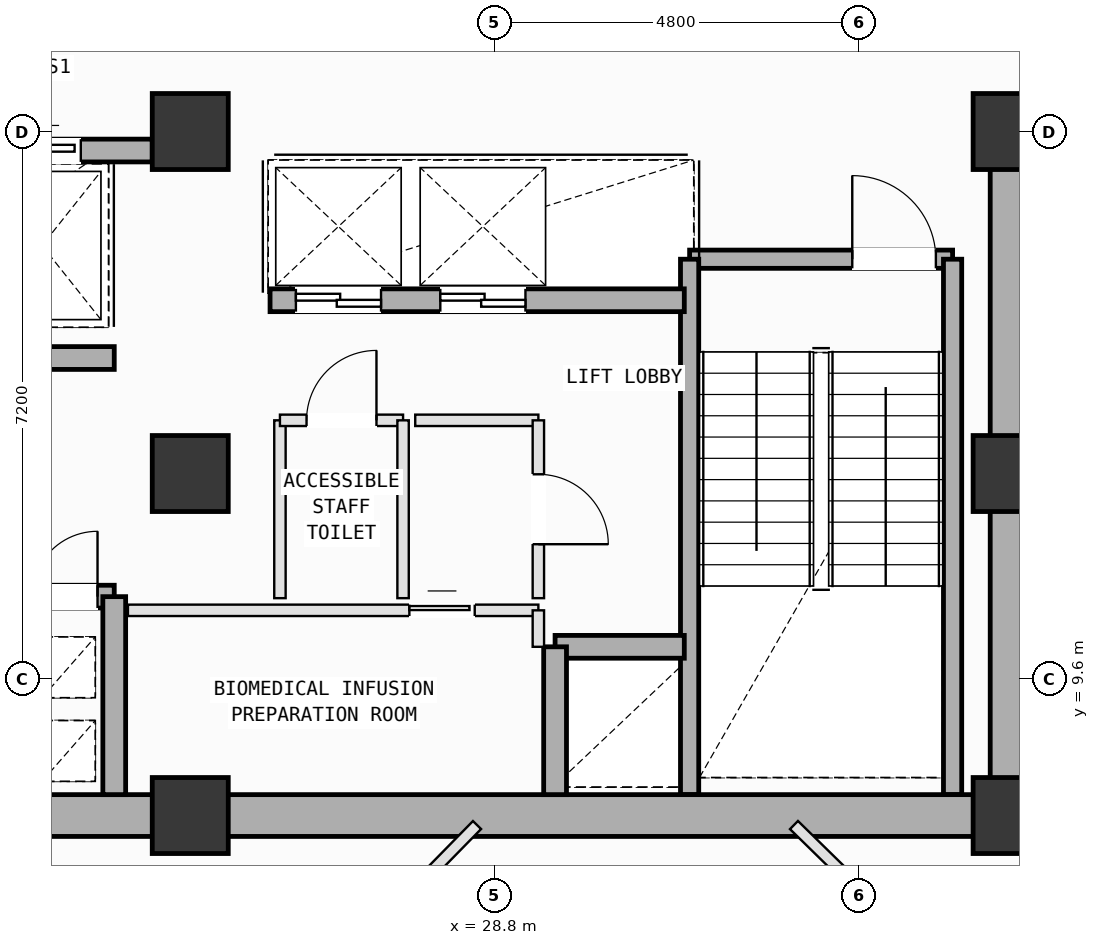
"""IFC4 building model, lengths in metres.
Left out: names, types, materials, properties, quantities, classifications, styles, units other than length and angle.
Written with IfcOpenShell. Run it as: python <this file> out.ifc"""

import sys

from ifc_helpers import new_model, si_unit, direction, frame, frame_2d, origin, origin_2d, place, context, subcontext, project, spatial, rectangle, extrude, element, fill, save


model = new_model("IFC4")
c1 = context("Model", 3, precision=1e-05, world=origin(), true_north=direction((0.0, 1.0)))
c2 = subcontext(c1, "Body", "Model", "MODEL_VIEW")
j1 = project(units=[si_unit("LENGTHUNIT", "METRE"), si_unit("PLANEANGLEUNIT", "RADIAN")], contexts=[c1])
p1 = place(None, origin())
s1 = spatial("IfcSite", under=j1, at=p1, CompositionType="ELEMENT")
p2 = place(p1, origin())
s2 = spatial("IfcBuilding", under=s1, at=p2, CompositionType="ELEMENT")
p3 = place(p2, frame((0.0, 0.0, 219.2)))
s3 = spatial("IfcBuildingStorey", under=s2, at=p3, CompositionType="ELEMENT", Elevation=219.2)
for number, where, z_axis, x_axis in (
    (1, (24.8, 7.8, 0.0), (0.0, 0.0, 1.0), (1.0, 0.0, 0.0)),
    (2, (24.8, 12.3, 0.0), (0.0, 0.0, 1.0), (1.0, 0.0, 0.0)),
    (3, (24.8, 16.8, 0.0), (0.0, 0.0, 1.0), (1.0, 0.0, 0.0)),
    (4, (35.6, 7.8, 0.0), (0.0, 0.0, 1.0), (1.0, 0.0, 0.0)),
    (5, (35.6, 12.3, 0.0), (0.0, 0.0, 1.0), (1.0, 0.0, 0.0)),
    (6, (35.6, 16.8, 0.0), (0.0, 0.0, 1.0), (1.0, 0.0, 0.0)),
):
    element("IfcColumn", number, at=place(p3, frame(where, z_axis=z_axis, x_axis=x_axis)), inside=s3, PredefinedType="COLUMN", context=c2, shape_type="SweptSolid", body=[
        extrude(rectangle(XDim=1.0, YDim=1.0, at=origin_2d()), origin(), (0.0, 0.0, 1.0), 4.0),
    ])
p4 = place(p3, frame((31.37, 15.12, 0.0), z_axis=(0.0, 0.0, 1.0), x_axis=(1.0, 0.0, 0.0)))
e7 = element("IfcWall", 7, at=p4, inside=s3, PredefinedType="SOLIDWALL", context=c2, shape_type="SweptSolid", body=[
    extrude(rectangle(XDim=3.46, YDim=0.24, at=frame_2d((1.73, 0.0))), origin(), (0.0, 0.0, 1.0), 3.78),
])
p5 = place(p4, frame((2.14, 0.0, 0.0)))
e8 = element("IfcOpeningElement", 8, at=p5, cuts=e7, PredefinedType="OPENING", context=c2, shape_type="SweptSolid", body=[
    extrude(rectangle(XDim=1.1, YDim=2.15, at=frame_2d((0.55, 1.075))), frame((0.0, 0.13, 0.0), z_axis=(0.0, -1.0, 0.0), x_axis=(1.0, 0.0, 0.0)), (0.0, 0.0, 1.0), 0.26),
])
for number, where, z_axis, x_axis in (
    (9, (34.83, 15.12, 0.0), (0.0, 0.0, 1.0), (0.0, -1.0, 0.0)),
    (10, (31.37, 8.075, 0.0), (0.0, 0.0, 1.0), (0.0, 1.0, 0.0)),
):
    element("IfcWall", number, at=place(p3, frame(where, z_axis=z_axis, x_axis=x_axis)), inside=s3, PredefinedType="SOLIDWALL", context=c2, shape_type="SweptSolid", body=[
        extrude(rectangle(XDim=7.045, YDim=0.24, at=frame_2d((3.522, 0.0))), origin(), (0.0, 0.0, 1.0), 3.78),
    ])
for number, where, z_axis, x_axis in (
    (11, (14.0, 7.8, 0.0), (0.0, 0.0, 1.0), (1.0, 0.0, 0.0)),
    (12, (24.8, 7.8, 0.0), (0.0, 0.0, 1.0), (1.0, 0.0, 0.0)),
):
    element("IfcWall", number, at=place(p3, frame(where, z_axis=z_axis, x_axis=x_axis)), inside=s3, PredefinedType="SHEAR", context=c2, shape_type="SweptSolid", body=[
        extrude(rectangle(XDim=10.8, YDim=0.55, at=frame_2d((5.4, 0.0))), origin(), (0.0, 0.0, 1.0), 3.78),
    ])
p6 = place(p3, frame((35.6, 7.8, 0.0), z_axis=(0.0, 0.0, 1.0), x_axis=(0.0, 1.0, 0.0)))
e13 = element("IfcWall", 13, at=p6, inside=s3, PredefinedType="SHEAR", context=c2, shape_type="SweptSolid", body=[
    extrude(rectangle(XDim=9.0, YDim=0.55, at=frame_2d((4.5, 0.0))), origin(), (0.0, 0.0, 1.0), 3.78),
])
p7 = place(p3, frame((19.85, 16.55, 0.0), z_axis=(0.0, 0.0, 1.0), x_axis=(1.0, 0.0, 0.0)))
e14 = element("IfcWall", 14, at=p7, inside=s3, PredefinedType="SOLIDWALL", context=c2, shape_type="SweptSolid", body=[
    extrude(rectangle(XDim=4.45, YDim=0.3, at=frame_2d((2.225, 0.0))), origin(), (0.0, 0.0, 1.0), 3.78),
])
p8 = place(p7, frame((0.475, 0.0, 0.0)))
e15 = element("IfcOpeningElement", 15, at=p8, cuts=e14, PredefinedType="OPENING", context=c2, shape_type="SweptSolid", body=[
    extrude(rectangle(XDim=1.25, YDim=2.18, at=frame_2d((0.625, 1.09))), frame((0.0, 0.16, 0.0), z_axis=(0.0, -1.0, 0.0), x_axis=(1.0, 0.0, 0.0)), (0.0, 0.0, 1.0), 0.32),
])
p9 = place(p7, frame((2.49, 0.0, 0.0)))
e16 = element("IfcOpeningElement", 16, at=p9, cuts=e14, PredefinedType="OPENING", context=c2, shape_type="SweptSolid", body=[
    extrude(rectangle(XDim=1.02, YDim=2.12, at=frame_2d((0.51, 1.06))), frame((0.0, 0.16, 0.0), z_axis=(0.0, -1.0, 0.0), x_axis=(1.0, 0.0, 0.0)), (0.0, 0.0, 1.0), 0.32),
])
p10 = place(p3, frame((18.5, 10.68, 0.0), z_axis=(0.0, 0.0, 1.0), x_axis=(1.0, 0.0, 0.0)))
e17 = element("IfcWall", 17, at=p10, inside=s3, PredefinedType="SOLIDWALL", context=c2, shape_type="SweptSolid", body=[
    extrude(rectangle(XDim=5.3, YDim=0.3, at=frame_2d((2.65, 0.0))), origin(), (0.0, 0.0, 1.0), 3.78),
])
p11 = place(p10, frame((4.22, 0.0, 0.0)))
e18 = element("IfcOpeningElement", 18, at=p11, cuts=e17, PredefinedType="OPENING", context=c2, shape_type="SweptSolid", body=[
    extrude(rectangle(XDim=0.86, YDim=2.06, at=frame_2d((0.43, 1.03))), frame((0.0, 0.16, 0.0), z_axis=(0.0, -1.0, 0.0), x_axis=(1.0, 0.0, 0.0)), (0.0, 0.0, 1.0), 0.32),
])
p12 = place(p10, frame((0.425, 0.0, 0.0)))
e19 = element("IfcOpeningElement", 19, at=p12, cuts=e17, PredefinedType="OPENING", context=c2, shape_type="SweptSolid", body=[
    extrude(rectangle(XDim=1.25, YDim=2.18, at=frame_2d((0.625, 1.09))), frame((0.0, 0.16, 0.0), z_axis=(0.0, -1.0, 0.0), x_axis=(1.0, 0.0, 0.0)), (0.0, 0.0, 1.0), 0.32),
])
p13 = place(p10, frame((2.525, 0.0, 0.0)))
e20 = element("IfcOpeningElement", 20, at=p13, cuts=e17, PredefinedType="OPENING", context=c2, shape_type="SweptSolid", body=[
    extrude(rectangle(XDim=1.25, YDim=2.18, at=frame_2d((0.625, 1.09))), frame((0.0, 0.16, 0.0), z_axis=(0.0, -1.0, 0.0), x_axis=(1.0, 0.0, 0.0)), (0.0, 0.0, 1.0), 0.32),
])
p14 = place(p3, frame((18.5, 13.82, 0.0), z_axis=(0.0, 0.0, 1.0), x_axis=(1.0, 0.0, 0.0)))
e21 = element("IfcWall", 21, at=p14, inside=s3, PredefinedType="SOLIDWALL", context=c2, shape_type="SweptSolid", body=[
    extrude(rectangle(XDim=5.3, YDim=0.3, at=frame_2d((2.65, 0.0))), origin(), (0.0, 0.0, 1.0), 3.78),
])
p15 = place(p14, frame((0.18, 0.0, 0.0)))
e22 = element("IfcOpeningElement", 22, at=p15, cuts=e21, PredefinedType="OPENING", context=c2, shape_type="SweptSolid", body=[
    extrude(rectangle(XDim=1.1, YDim=2.15, at=frame_2d((0.55, 1.075))), frame((0.0, 0.16, 0.0), z_axis=(0.0, -1.0, 0.0), x_axis=(1.0, 0.0, 0.0)), (0.0, 0.0, 1.0), 0.32),
])
p16 = place(p3, frame((23.8, 8.075, 0.0), z_axis=(0.0, 0.0, 1.0), x_axis=(0.0, 1.0, 0.0)))
e23 = element("IfcWall", 23, at=p16, inside=s3, PredefinedType="SOLIDWALL", context=c2, shape_type="SweptSolid", body=[
    extrude(rectangle(XDim=2.605, YDim=0.3, at=frame_2d((1.302, 0.0))), origin(), (0.0, 0.0, 1.0), 3.78),
])
p17 = place(p3, frame((29.6, 10.02, 0.0), z_axis=(0.0, 0.0, 1.0), x_axis=(1.0, 0.0, 0.0)))
e24 = element("IfcWall", 24, at=p17, inside=s3, PredefinedType="SOLIDWALL", context=c2, shape_type="SweptSolid", body=[
    extrude(rectangle(XDim=1.7, YDim=0.3, at=frame_2d((0.85, 0.0))), origin(), (0.0, 0.0, 1.0), 3.78),
])
p18 = place(p3, frame((29.6, 8.075, 0.0), z_axis=(0.0, 0.0, 1.0), x_axis=(0.0, 1.0, 0.0)))
e25 = element("IfcWall", 25, at=p18, inside=s3, PredefinedType="SOLIDWALL", context=c2, shape_type="SweptSolid", body=[
    extrude(rectangle(XDim=1.945, YDim=0.3, at=frame_2d((0.973, 0.0))), origin(), (0.0, 0.0, 1.0), 3.78),
])
p19 = place(p3, frame((25.85, 14.58, 0.0), z_axis=(0.0, 0.0, 1.0), x_axis=(1.0, 0.0, 0.0)))
e26 = element("IfcWall", 26, at=p19, inside=s3, PredefinedType="SOLIDWALL", context=c2, shape_type="SweptSolid", body=[
    extrude(rectangle(XDim=5.45, YDim=0.3, at=frame_2d((2.725, 0.0))), origin(), (0.0, 0.0, 1.0), 3.78),
])
p20 = place(p19, frame((0.34, 0.0, 0.0)))
e27 = element("IfcOpeningElement", 27, at=p20, cuts=e26, PredefinedType="OPENING", context=c2, shape_type="SweptSolid", body=[
    extrude(rectangle(XDim=1.12, YDim=2.15, at=frame_2d((0.56, 1.075))), frame((0.0, 0.16, 0.0), z_axis=(0.0, -1.0, 0.0), x_axis=(1.0, 0.0, 0.0)), (0.0, 0.0, 1.0), 0.32),
])
p21 = place(p19, frame((2.24, 0.0, 0.0)))
e28 = element("IfcOpeningElement", 28, at=p21, cuts=e26, PredefinedType="OPENING", context=c2, shape_type="SweptSolid", body=[
    extrude(rectangle(XDim=1.12, YDim=2.15, at=frame_2d((0.56, 1.075))), frame((0.0, 0.16, 0.0), z_axis=(0.0, -1.0, 0.0), x_axis=(1.0, 0.0, 0.0)), (0.0, 0.0, 1.0), 0.32),
])
p22 = place(p3, frame((23.98, 10.5, 0.0), z_axis=(0.0, 0.0, 1.0), x_axis=(1.0, 0.0, 0.0)))
e29 = element("IfcWall", 29, at=p22, inside=s3, PredefinedType="PARTITIONING", context=c2, shape_type="SweptSolid", body=[
    extrude(rectangle(XDim=5.4, YDim=0.15, at=frame_2d((2.7, 0.0))), origin(), (0.0, 0.0, 1.0), 3.78),
])
p23 = place(p22, frame((3.703, 0.0, 0.0)))
e30 = element("IfcOpeningElement", 30, at=p23, cuts=e29, PredefinedType="OPENING", context=c2, shape_type="SweptSolid", body=[
    extrude(rectangle(XDim=0.86, YDim=2.06, at=frame_2d((0.43, 1.03))), frame((0.0, 0.085, 0.0), z_axis=(0.0, -1.0, 0.0), x_axis=(1.0, 0.0, 0.0)), (0.0, 0.0, 1.0), 0.17),
])
p24 = place(p3, frame((29.38, 10.5, 0.0), z_axis=(0.0, 0.0, 1.0), x_axis=(0.0, -1.0, 0.0)))
e31 = element("IfcWall", 31, at=p24, inside=s3, PredefinedType="PARTITIONING", context=c2, shape_type="SweptSolid", body=[
    extrude(rectangle(XDim=0.48, YDim=0.15, at=frame_2d((0.24, 0.0))), origin(), (0.0, 0.0, 1.0), 3.78),
])
p25 = place(p3, frame((25.98, 10.66, 0.0), z_axis=(0.0, 0.0, 1.0), x_axis=(0.0, 1.0, 0.0)))
e32 = element("IfcWall", 32, at=p25, inside=s3, PredefinedType="PARTITIONING", context=c2, shape_type="SweptSolid", body=[
    extrude(rectangle(XDim=2.34, YDim=0.15, at=frame_2d((1.17, 0.0))), origin(), (0.0, 0.0, 1.0), 3.78),
])
p26 = place(p3, frame((25.98, 13.0, 0.0), z_axis=(0.0, 0.0, 1.0), x_axis=(1.0, 0.0, 0.0)))
e33 = element("IfcWall", 33, at=p26, inside=s3, PredefinedType="PARTITIONING", context=c2, shape_type="SweptSolid", body=[
    extrude(rectangle(XDim=1.62, YDim=0.15, at=frame_2d((0.81, 0.0))), origin(), (0.0, 0.0, 1.0), 3.78),
])
p27 = place(p26, frame((0.35, 0.0, 0.0)))
e34 = element("IfcOpeningElement", 34, at=p27, cuts=e33, PredefinedType="OPENING", context=c2, shape_type="SweptSolid", body=[
    extrude(rectangle(XDim=0.92, YDim=2.1, at=frame_2d((0.46, 1.05))), frame((0.0, 0.085, 0.0), z_axis=(0.0, -1.0, 0.0), x_axis=(1.0, 0.0, 0.0)), (0.0, 0.0, 1.0), 0.17),
])
p28 = place(p3, frame((27.6, 13.0, 0.0), z_axis=(0.0, 0.0, 1.0), x_axis=(0.0, -1.0, 0.0)))
e35 = element("IfcWall", 35, at=p28, inside=s3, PredefinedType="PARTITIONING", context=c2, shape_type="SweptSolid", body=[
    extrude(rectangle(XDim=2.34, YDim=0.15, at=frame_2d((1.17, 0.0))), origin(), (0.0, 0.0, 1.0), 3.78),
])
p29 = place(p3, frame((27.76, 13.0, 0.0), z_axis=(0.0, 0.0, 1.0), x_axis=(1.0, 0.0, 0.0)))
e36 = element("IfcWall", 36, at=p29, inside=s3, PredefinedType="PARTITIONING", context=c2, shape_type="SweptSolid", body=[
    extrude(rectangle(XDim=1.62, YDim=0.15, at=frame_2d((0.81, 0.0))), origin(), (0.0, 0.0, 1.0), 3.78),
])
p30 = place(p3, frame((29.38, 13.0, 0.0), z_axis=(0.0, 0.0, 1.0), x_axis=(0.0, -1.0, 0.0)))
e37 = element("IfcWall", 37, at=p30, inside=s3, PredefinedType="PARTITIONING", context=c2, shape_type="SweptSolid", body=[
    extrude(rectangle(XDim=2.34, YDim=0.15, at=frame_2d((1.17, 0.0))), origin(), (0.0, 0.0, 1.0), 3.78),
])
p31 = place(p30, frame((0.71, 0.0, 0.0)))
e38 = element("IfcOpeningElement", 38, at=p31, cuts=e37, PredefinedType="OPENING", context=c2, shape_type="SweptSolid", body=[
    extrude(rectangle(XDim=0.92, YDim=2.1, at=frame_2d((0.46, 1.05))), frame((0.0, 0.085, 0.0), z_axis=(0.0, -1.0, 0.0), x_axis=(1.0, 0.0, 0.0)), (0.0, 0.0, 1.0), 0.17),
])
p32 = place(p3, frame((32.743, 7.675, 0.0), z_axis=(0.0, 0.0, 1.0), x_axis=(0.714416186627, -0.699721024613, 0.0)))
e39 = element("IfcWall", 39, at=p32, inside=s3, PredefinedType="PARTITIONING", context=c2, shape_type="SweptSolid", body=[
    extrude(rectangle(XDim=10.766, YDim=0.15, at=frame_2d((5.383, 0.0))), origin(), (0.0, 0.0, 1.0), 3.78),
])
p33 = place(p32, frame((5.176, 0.0, 0.0)))
e40 = element("IfcOpeningElement", 40, at=p33, cuts=e39, PredefinedType="OPENING", context=c2, shape_type="SweptSolid", body=[
    extrude(rectangle(XDim=0.86, YDim=2.06, at=frame_2d((0.43, 1.03))), frame((0.0, 0.085, 0.0), z_axis=(0.0, -1.0, 0.0), x_axis=(1.0, 0.0, 0.0)), (0.0, 0.0, 1.0), 0.17),
])
p34 = place(p3, frame((35.6, 7.5, 0.0), z_axis=(0.0, 0.0, 1.0), x_axis=(1.0, 0.0, 0.0)))
e41 = element("IfcWall", 41, at=p34, inside=s3, PredefinedType="PARTITIONING", context=c2, shape_type="SweptSolid", body=[
    extrude(rectangle(XDim=0.55, YDim=0.15, at=frame_2d((0.275, 0.0))), origin(), (0.0, 0.0, 1.0), 3.78),
])
p35 = place(p3, frame((28.573, 7.675, 0.0), z_axis=(0.0, 0.0, 1.0), x_axis=(-0.699638018891, -0.714497475519, 0.0)))
e42 = element("IfcWall", 42, at=p35, inside=s3, PredefinedType="PARTITIONING", context=c2, shape_type="SweptSolid", body=[
    extrude(rectangle(XDim=11.583, YDim=0.15, at=frame_2d((5.792, 0.0))), origin(), (0.0, 0.0, 1.0), 3.78),
])
p36 = place(p5, origin())
e43 = element("IfcDoor", 43, at=p36, inside=s3, OperationType="SINGLE_SWING_LEFT", PredefinedType="DOOR", context=c2, shape_type="SweptSolid", body=[
    extrude(rectangle(XDim=1.1, YDim=2.15, at=frame_2d((0.55, 1.075))), frame((0.0, 0.025, 0.0), z_axis=(0.0, -1.0, 0.0), x_axis=(1.0, 0.0, 0.0)), (0.0, 0.0, 1.0), 0.05),
])
fill(e8, e43)
p37 = place(p11, origin())
e44 = element("IfcDoor", 44, at=p37, inside=s3, OperationType="SINGLE_SWING_RIGHT", PredefinedType="DOOR", context=c2, shape_type="SweptSolid", body=[
    extrude(rectangle(XDim=0.86, YDim=2.06, at=frame_2d((0.43, 1.03))), frame((0.0, 0.025, 0.0), z_axis=(0.0, -1.0, 0.0), x_axis=(1.0, 0.0, 0.0)), (0.0, 0.0, 1.0), 0.05),
])
fill(e18, e44)
p38 = place(p20, origin())
e45 = element("IfcDoor", 45, at=p38, inside=s3, OperationType="DOUBLE_DOOR_SLIDING", PredefinedType="DOOR", context=c2, shape_type="SweptSolid", body=[
    extrude(rectangle(XDim=1.12, YDim=2.15, at=frame_2d((0.56, 1.075))), frame((0.0, 0.025, 0.0), z_axis=(0.0, -1.0, 0.0), x_axis=(1.0, 0.0, 0.0)), (0.0, 0.0, 1.0), 0.05),
])
fill(e27, e45)
p39 = place(p21, origin())
e46 = element("IfcDoor", 46, at=p39, inside=s3, OperationType="DOUBLE_DOOR_SLIDING", PredefinedType="DOOR", context=c2, shape_type="SweptSolid", body=[
    extrude(rectangle(XDim=1.12, YDim=2.15, at=frame_2d((0.56, 1.075))), frame((0.0, 0.025, 0.0), z_axis=(0.0, -1.0, 0.0), x_axis=(1.0, 0.0, 0.0)), (0.0, 0.0, 1.0), 0.05),
])
fill(e28, e46)
p40 = place(p9, origin())
e47 = element("IfcDoor", 47, at=p40, inside=s3, OperationType="SLIDING_TO_LEFT", PredefinedType="DOOR", context=c2, shape_type="SweptSolid", body=[
    extrude(rectangle(XDim=1.02, YDim=2.12, at=frame_2d((0.51, 1.06))), frame((0.0, 0.025, 0.0), z_axis=(0.0, -1.0, 0.0), x_axis=(1.0, 0.0, 0.0)), (0.0, 0.0, 1.0), 0.05),
])
fill(e16, e47)
p41 = place(p27, origin())
e48 = element("IfcDoor", 48, at=p41, inside=s3, OperationType="SINGLE_SWING_RIGHT", PredefinedType="DOOR", context=c2, shape_type="SweptSolid", body=[
    extrude(rectangle(XDim=0.92, YDim=2.1, at=frame_2d((0.46, 1.05))), frame((0.0, 0.025, 0.0), z_axis=(0.0, -1.0, 0.0), x_axis=(1.0, 0.0, 0.0)), (0.0, 0.0, 1.0), 0.05),
])
fill(e34, e48)
p42 = place(p31, origin())
e49 = element("IfcDoor", 49, at=p42, inside=s3, OperationType="SINGLE_SWING_RIGHT", PredefinedType="DOOR", context=c2, shape_type="SweptSolid", body=[
    extrude(rectangle(XDim=0.92, YDim=2.1, at=frame_2d((0.46, 1.05))), frame((0.0, 0.025, 0.0), z_axis=(0.0, -1.0, 0.0), x_axis=(1.0, 0.0, 0.0)), (0.0, 0.0, 1.0), 0.05),
])
fill(e38, e49)
p43 = place(p23, origin())
e50 = element("IfcDoor", 50, at=p43, inside=s3, OperationType="SLIDING_TO_LEFT", PredefinedType="DOOR", context=c2, shape_type="SweptSolid", body=[
    extrude(rectangle(XDim=0.86, YDim=2.06, at=frame_2d((0.43, 1.03))), frame((0.0, 0.025, 0.0), z_axis=(0.0, -1.0, 0.0), x_axis=(1.0, 0.0, 0.0)), (0.0, 0.0, 1.0), 0.05),
])
fill(e30, e50)
save(model, sys.argv[1])
